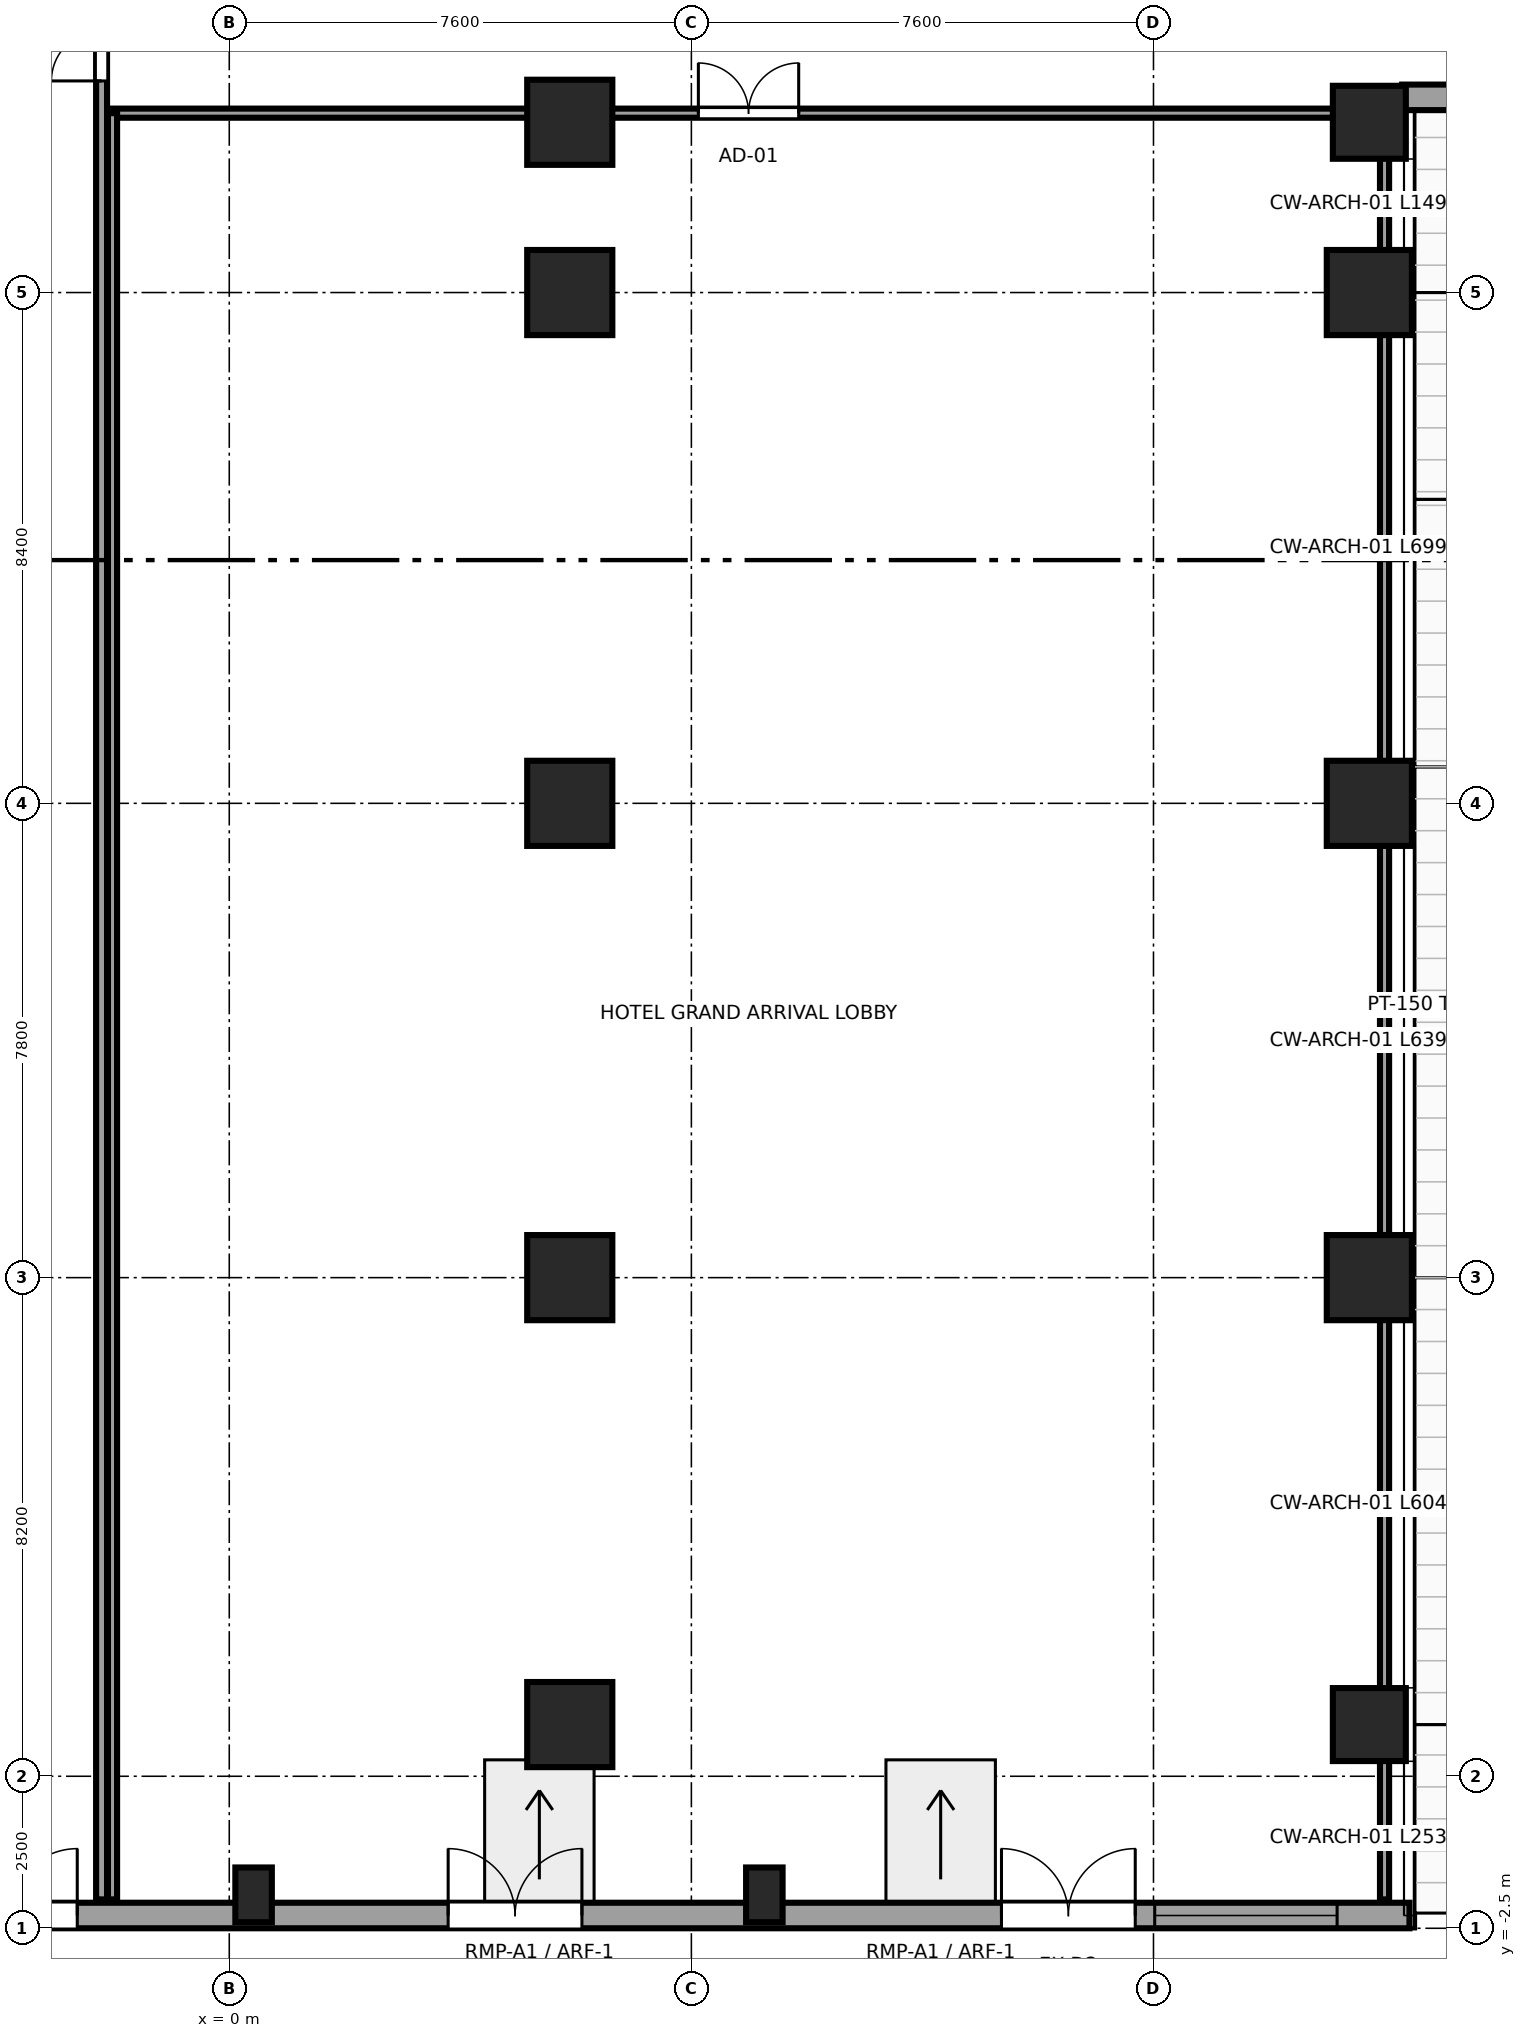
"""IFC4 building model, lengths in metres.
Left out: names, types, materials, properties, quantities, classifications, styles, units other than length and angle.
Written with IfcOpenShell. Run it as: python <this file> out.ifc"""

import sys

from ifc_helpers import new_model, si_unit, direction, frame, frame_2d, origin, origin_2d, place, context, subcontext, project, spatial, rectangle, circle, extrude, source, transform, mapped, element, fill, save


model = new_model("IFC4")
c1 = context("Model", 3, precision=1e-05, world=origin(), true_north=direction((0.0, 1.0)))
c2 = subcontext(c1, "Body", "Model", "MODEL_VIEW")
j1 = project(units=[si_unit("LENGTHUNIT", "METRE"), si_unit("PLANEANGLEUNIT", "RADIAN")], contexts=[c1])
p1 = place(None, origin())
s1 = spatial("IfcSite", under=j1, at=p1, CompositionType="ELEMENT")
p2 = place(p1, origin())
s2 = spatial("IfcBuilding", under=s1, at=p2, CompositionType="ELEMENT")
p3 = place(p2, origin())
s3 = spatial("IfcBuildingStorey", under=s2, at=p3, CompositionType="ELEMENT", Elevation=0.0)
m1 = source(origin(), c2, "Body", "SweptSolid", [
    extrude(circle(Radius=0.6, at=origin_2d()), origin(), (0.0, 0.0, 1.0), 6.0),
])
p4 = place(p3, frame((18.75, 0.85, 0.0), z_axis=(0.0, 0.0, 1.0), x_axis=(1.0, 0.0, 0.0)))
e1 = element("IfcColumn", 1, at=p4, inside=s3, PredefinedType="COLUMN", context=c2, shape_type="MappedRepresentation", body=[
    mapped(m1, transform((0.0, 0.0, 0.0), x_axis=(1.0, 0.0, 0.0), y_axis=(0.0, 1.0, 0.0), z_axis=(0.0, 0.0, 1.0), scale=1.0)),
])
m2 = source(origin(), c2, "Body", "SweptSolid", [
    extrude(rectangle(XDim=1.4, YDim=1.4, at=origin_2d()), origin(), (0.0, 0.0, 1.0), 6.0),
])
for number, where, z_axis, x_axis in (
    (2, (18.75, 8.2, 0.0), (0.0, 0.0, 1.0), (1.0, 0.0, 0.0)),
    (3, (18.75, 16.0, 0.0), (0.0, 0.0, 1.0), (1.0, 0.0, 0.0)),
    (4, (18.75, 24.4, 0.0), (0.0, 0.0, 1.0), (1.0, 0.0, 0.0)),
):
    element("IfcColumn", number, at=place(p3, frame(where, z_axis=z_axis, x_axis=x_axis)), inside=s3, PredefinedType="COLUMN", context=c2, shape_type="MappedRepresentation", body=[
        mapped(m2, transform((0.0, 0.0, 0.0), x_axis=(1.0, 0.0, 0.0), y_axis=(0.0, 1.0, 0.0), z_axis=(0.0, 0.0, 1.0), scale=1.0)),
    ])
p5 = place(p3, frame((18.75, 27.2, 0.0), z_axis=(0.0, 0.0, 1.0), x_axis=(1.0, 0.0, 0.0)))
e5 = element("IfcColumn", 5, at=p5, inside=s3, PredefinedType="COLUMN", context=c2, shape_type="MappedRepresentation", body=[
    mapped(m1, transform((0.0, 0.0, 0.0), x_axis=(1.0, 0.0, 0.0), y_axis=(0.0, 1.0, 0.0), z_axis=(0.0, 0.0, 1.0), scale=1.0)),
])
for number, where, z_axis, x_axis in (
    (6, (5.6, 0.85, 0.0), (0.0, 0.0, 1.0), (1.0, 0.0, 0.0)),
    (7, (5.6, 8.2, 0.0), (0.0, 0.0, 1.0), (1.0, 0.0, 0.0)),
    (8, (5.6, 16.0, 0.0), (0.0, 0.0, 1.0), (1.0, 0.0, 0.0)),
    (9, (5.6, 24.4, 0.0), (0.0, 0.0, 1.0), (1.0, 0.0, 0.0)),
    (10, (5.6, 27.2, 0.0), (0.0, 0.0, 1.0), (1.0, 0.0, 0.0)),
):
    element("IfcColumn", number, at=place(p3, frame(where, z_axis=z_axis, x_axis=x_axis)), inside=s3, PredefinedType="COLUMN", context=c2, shape_type="MappedRepresentation", body=[
        mapped(m2, transform((0.0, 0.0, 0.0), x_axis=(1.0, 0.0, 0.0), y_axis=(0.0, 1.0, 0.0), z_axis=(0.0, 0.0, 1.0), scale=1.0)),
    ])
m3 = source(origin(), c2, "Body", "SweptSolid", [
    extrude(rectangle(XDim=0.6, YDim=0.9, at=origin_2d()), origin(), (0.0, 0.0, 1.0), 6.0),
])
for number, where, z_axis, x_axis in (
    (11, (0.4, -1.95, 0.0), (0.0, 0.0, 1.0), (1.0, 0.0, 0.0)),
    (12, (8.8, -1.95, 0.0), (0.0, 0.0, 1.0), (1.0, 0.0, 0.0)),
):
    element("IfcColumn", number, at=place(p3, frame(where, z_axis=z_axis, x_axis=x_axis)), inside=s3, PredefinedType="PILASTER", context=c2, shape_type="MappedRepresentation", body=[
        mapped(m3, transform((0.0, 0.0, 0.0), x_axis=(1.0, 0.0, 0.0), y_axis=(0.0, 1.0, 0.0), z_axis=(0.0, 0.0, 1.0), scale=1.0)),
    ])
p6 = place(p3, frame((19.29, 27.61, 0.0), z_axis=(0.0, 0.0, 1.0), x_axis=(1.0, 0.0, 0.0)))
e13 = element("IfcWall", 13, at=p6, inside=s3, PredefinedType="SOLIDWALL", context=c2, shape_type="SweptSolid", body=[
    extrude(rectangle(XDim=18.42, YDim=0.42, at=frame_2d((9.21, 0.0))), origin(), (0.0, 0.0, 1.0), 5.74),
])
p7 = place(p6, frame((1.97, 0.0, 0.65)))
e14 = element("IfcOpeningElement", 14, at=p7, cuts=e13, PredefinedType="OPENING", context=c2, shape_type="SweptSolid", body=[
    extrude(rectangle(XDim=3.0, YDim=2.5, at=frame_2d((1.5, 1.25))), frame((0.0, 0.22, 0.0), z_axis=(0.0, -1.0, 0.0), x_axis=(1.0, 0.0, 0.0)), (0.0, 0.0, 1.0), 0.44),
])
p8 = place(p6, frame((7.71, 0.0, 0.65)))
e15 = element("IfcOpeningElement", 15, at=p8, cuts=e13, PredefinedType="OPENING", context=c2, shape_type="SweptSolid", body=[
    extrude(rectangle(XDim=3.0, YDim=2.5, at=frame_2d((1.5, 1.25))), frame((0.0, 0.22, 0.0), z_axis=(0.0, -1.0, 0.0), x_axis=(1.0, 0.0, 0.0)), (0.0, 0.0, 1.0), 0.44),
])
p9 = place(p6, frame((13.45, 0.0, 0.65)))
e16 = element("IfcOpeningElement", 16, at=p9, cuts=e13, PredefinedType="OPENING", context=c2, shape_type="SweptSolid", body=[
    extrude(rectangle(XDim=3.0, YDim=2.5, at=frame_2d((1.5, 1.25))), frame((0.0, 0.22, 0.0), z_axis=(0.0, -1.0, 0.0), x_axis=(1.0, 0.0, 0.0)), (0.0, 0.0, 1.0), 0.44),
])
p10 = place(p3, frame((-8.19, -2.29, 0.0), z_axis=(0.0, 0.0, 1.0), x_axis=(1.0, 0.0, 0.0)))
e17 = element("IfcWall", 17, at=p10, inside=s3, PredefinedType="SOLIDWALL", context=c2, shape_type="SweptSolid", body=[
    extrude(rectangle(XDim=27.6, YDim=0.42, at=frame_2d((13.8, 0.0))), origin(), (0.0, 0.0, 1.0), 5.74),
])
p11 = place(p10, frame((5.69, 0.0, 0.0), z_axis=(0.0, 0.0, 1.0), x_axis=(-1.0, 0.0, 0.0)))
e18 = element("IfcOpeningElement", 18, at=p11, cuts=e17, PredefinedType="OPENING", context=c2, shape_type="SweptSolid", body=[
    extrude(rectangle(XDim=2.2, YDim=2.25, at=frame_2d((1.1, 1.125))), frame((0.0, 0.22, 0.0), z_axis=(0.0, -1.0, 0.0), x_axis=(1.0, 0.0, 0.0)), (0.0, 0.0, 1.0), 0.44),
])
p12 = place(p10, frame((13.99, 0.0, 0.0), z_axis=(0.0, 0.0, 1.0), x_axis=(-1.0, 0.0, 0.0)))
e19 = element("IfcOpeningElement", 19, at=p12, cuts=e17, PredefinedType="OPENING", context=c2, shape_type="SweptSolid", body=[
    extrude(rectangle(XDim=2.2, YDim=2.25, at=frame_2d((1.1, 1.125))), frame((0.0, 0.22, 0.0), z_axis=(0.0, -1.0, 0.0), x_axis=(1.0, 0.0, 0.0)), (0.0, 0.0, 1.0), 0.44),
])
p13 = place(p10, frame((23.09, 0.0, 0.0), z_axis=(0.0, 0.0, 1.0), x_axis=(-1.0, 0.0, 0.0)))
e20 = element("IfcOpeningElement", 20, at=p13, cuts=e17, PredefinedType="OPENING", context=c2, shape_type="SweptSolid", body=[
    extrude(rectangle(XDim=2.2, YDim=2.25, at=frame_2d((1.1, 1.125))), frame((0.0, 0.22, 0.0), z_axis=(0.0, -1.0, 0.0), x_axis=(1.0, 0.0, 0.0)), (0.0, 0.0, 1.0), 0.44),
])
p14 = place(p10, frame((23.41, 0.0, 0.65)))
e21 = element("IfcOpeningElement", 21, at=p14, cuts=e17, PredefinedType="OPENING", context=c2, shape_type="SweptSolid", body=[
    extrude(rectangle(XDim=3.0, YDim=2.5, at=frame_2d((1.5, 1.25))), frame((0.0, 0.22, 0.0), z_axis=(0.0, -1.0, 0.0), x_axis=(1.0, 0.0, 0.0)), (0.0, 0.0, 1.0), 0.44),
])
p15 = place(p3, frame((-2.1, -2.025, 0.0), z_axis=(0.0, 0.0, 1.0), x_axis=(0.0, 1.0, 0.0)))
e22 = element("IfcWall", 22, at=p15, inside=s3, PredefinedType="PARTITIONING", context=c2, shape_type="SweptSolid", body=[
    extrude(rectangle(XDim=31.825, YDim=0.18, at=frame_2d((15.913, 0.0))), origin(), (0.0, 0.0, 1.0), 5.74),
])
p16 = place(p15, frame((29.905, 0.0, 0.0)))
e23 = element("IfcOpeningElement", 23, at=p16, cuts=e22, PredefinedType="OPENING", context=c2, shape_type="SweptSolid", body=[
    extrude(rectangle(XDim=1.65, YDim=2.15, at=frame_2d((0.825, 1.075))), frame((0.0, 0.1, 0.0), z_axis=(0.0, -1.0, 0.0), x_axis=(1.0, 0.0, 0.0)), (0.0, 0.0, 1.0), 0.2),
])
p17 = place(p3, frame((-1.92, 27.35, 0.0), z_axis=(0.0, 0.0, 1.0), x_axis=(1.0, 0.0, 0.0)))
e24 = element("IfcWall", 24, at=p17, inside=s3, PredefinedType="PARTITIONING", context=c2, shape_type="SweptSolid", body=[
    extrude(rectangle(XDim=20.92, YDim=0.15, at=frame_2d((10.46, 0.0))), origin(), (0.0, 0.0, 1.0), 4.53),
])
p18 = place(p17, frame((9.635, 0.0, 0.0)))
e25 = element("IfcOpeningElement", 25, at=p18, cuts=e24, PredefinedType="OPENING", context=c2, shape_type="SweptSolid", body=[
    extrude(rectangle(XDim=1.65, YDim=2.15, at=frame_2d((0.825, 1.075))), frame((0.0, 0.085, 0.0), z_axis=(0.0, -1.0, 0.0), x_axis=(1.0, 0.0, 0.0)), (0.0, 0.0, 1.0), 0.17),
])
p19 = place(p3, frame((-1.92, -2.025, 0.0), z_axis=(0.0, 0.0, 1.0), x_axis=(0.0, 1.0, 0.0)))
e26 = element("IfcWall", 26, at=p19, inside=s3, PredefinedType="PARTITIONING", context=c2, shape_type="SweptSolid", body=[
    extrude(rectangle(XDim=29.375, YDim=0.15, at=frame_2d((14.688, 0.0))), origin(), (0.0, 0.0, 1.0), 5.74),
])
p20 = place(p3, frame((19.0, -2.025, 0.0), z_axis=(0.0, 0.0, 1.0), x_axis=(0.0, 1.0, 0.0)))
e27 = element("IfcWall", 27, at=p20, inside=s3, PredefinedType="PARTITIONING", context=c2, shape_type="SweptSolid", body=[
    extrude(rectangle(XDim=29.425, YDim=0.15, at=frame_2d((14.712, 0.0))), origin(), (0.0, 0.0, 1.0), 5.74),
])
m4 = source(origin(), c2, "Body", "SweptSolid", [
    extrude(rectangle(XDim=2.2, YDim=2.25, at=frame_2d((1.1, 1.125))), frame((0.0, 0.025, 0.0), z_axis=(0.0, -1.0, 0.0), x_axis=(1.0, 0.0, 0.0)), (0.0, 0.0, 1.0), 0.05),
])
p21 = place(p11, origin())
e28 = element("IfcDoor", 28, at=p21, inside=s3, OperationType="DOUBLE_DOOR_SINGLE_SWING", PredefinedType="DOOR", context=c2, shape_type="MappedRepresentation", body=[
    mapped(m4, transform((0.0, 0.0, 0.0), x_axis=(1.0, 0.0, 0.0), y_axis=(0.0, 1.0, 0.0), z_axis=(0.0, 0.0, 1.0), scale=1.0)),
])
fill(e18, e28)
p22 = place(p12, origin())
e29 = element("IfcDoor", 29, at=p22, inside=s3, OperationType="DOUBLE_DOOR_SINGLE_SWING", PredefinedType="DOOR", context=c2, shape_type="MappedRepresentation", body=[
    mapped(m4, transform((0.0, 0.0, 0.0), x_axis=(1.0, 0.0, 0.0), y_axis=(0.0, 1.0, 0.0), z_axis=(0.0, 0.0, 1.0), scale=1.0)),
])
fill(e19, e29)
p23 = place(p13, origin())
e30 = element("IfcDoor", 30, at=p23, inside=s3, OperationType="DOUBLE_DOOR_SINGLE_SWING", PredefinedType="DOOR", context=c2, shape_type="MappedRepresentation", body=[
    mapped(m4, transform((0.0, 0.0, 0.0), x_axis=(1.0, 0.0, 0.0), y_axis=(0.0, 1.0, 0.0), z_axis=(0.0, 0.0, 1.0), scale=1.0)),
])
fill(e20, e30)
m5 = source(origin(), c2, "Body", "SweptSolid", [
    extrude(rectangle(XDim=3.0, YDim=2.5, at=frame_2d((1.5, 1.25))), frame((0.0, 0.09, 0.0), z_axis=(0.0, -1.0, 0.0), x_axis=(1.0, 0.0, 0.0)), (0.0, 0.0, 1.0), 0.06),
])
p24 = place(p14, origin())
e31 = element("IfcWindow", 31, at=p24, inside=s3, PartitioningType="TRIPLE_PANEL_HORIZONTAL", PredefinedType="WINDOW", context=c2, shape_type="MappedRepresentation", body=[
    mapped(m5, transform((0.0, 0.0, 0.0), x_axis=(1.0, 0.0, 0.0), y_axis=(0.0, 1.0, 0.0), z_axis=(0.0, 0.0, 1.0), scale=1.0)),
])
fill(e21, e31)
m6 = source(origin(), c2, "Body", "SweptSolid", [
    extrude(rectangle(XDim=1.65, YDim=2.15, at=frame_2d((0.825, 1.075))), frame((0.0, 0.025, 0.0), z_axis=(0.0, -1.0, 0.0), x_axis=(1.0, 0.0, 0.0)), (0.0, 0.0, 1.0), 0.05),
])
p25 = place(p16, origin())
e32 = element("IfcDoor", 32, at=p25, inside=s3, OperationType="DOUBLE_DOOR_SINGLE_SWING", PredefinedType="DOOR", context=c2, shape_type="MappedRepresentation", body=[
    mapped(m6, transform((0.0, 0.0, 0.0), x_axis=(1.0, 0.0, 0.0), y_axis=(0.0, 1.0, 0.0), z_axis=(0.0, 0.0, 1.0), scale=1.0)),
])
fill(e23, e32)
p26 = place(p18, origin())
e33 = element("IfcDoor", 33, at=p26, inside=s3, OperationType="DOUBLE_DOOR_SINGLE_SWING", PredefinedType="DOOR", context=c2, shape_type="MappedRepresentation", body=[
    mapped(m6, transform((0.0, 0.0, 0.0), x_axis=(1.0, 0.0, 0.0), y_axis=(0.0, 1.0, 0.0), z_axis=(0.0, 0.0, 1.0), scale=1.0)),
])
fill(e25, e33)
save(model, sys.argv[1])
